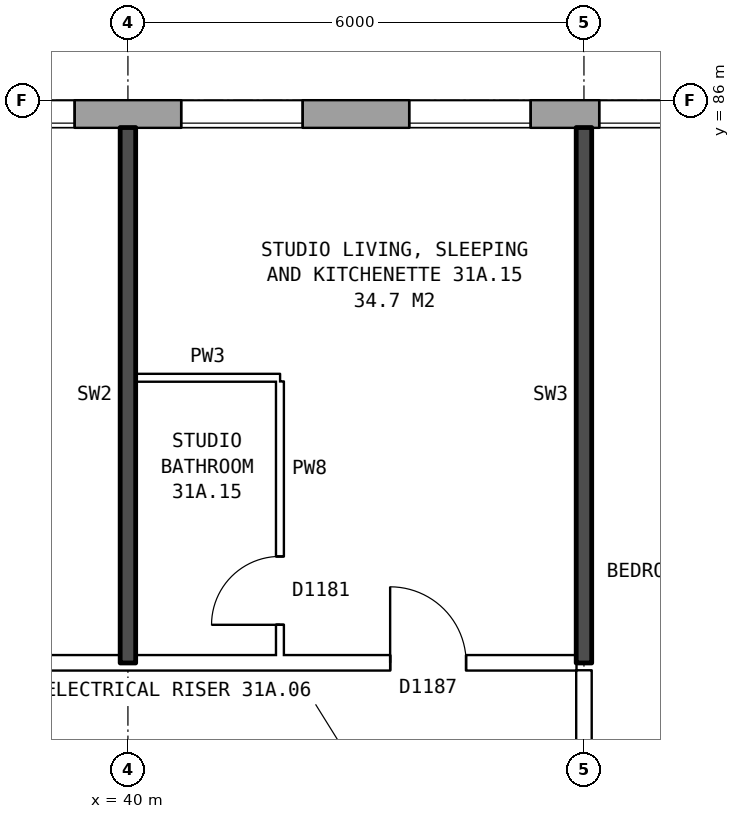
"""IFC4 building model, lengths in metres.
Left out: names, types, materials, properties, quantities, classifications, styles, units other than length and angle.
Written with IfcOpenShell. Run it as: python <this file> out.ifc"""

import sys

from ifc_helpers import new_model, si_unit, direction, frame, frame_2d, origin, place, context, subcontext, project, spatial, rectangle, extrude, element, fill, save


model = new_model("IFC4")
c1 = context("Model", 3, precision=1e-05, world=origin(), true_north=direction((0.0, 1.0)))
c2 = subcontext(c1, "Body", "Model", "MODEL_VIEW")
j1 = project(units=[si_unit("LENGTHUNIT", "METRE"), si_unit("PLANEANGLEUNIT", "RADIAN")], contexts=[c1])
p1 = place(None, origin())
s1 = spatial("IfcSite", under=j1, at=p1, CompositionType="ELEMENT")
p2 = place(p1, origin())
s2 = spatial("IfcBuilding", under=s1, at=p2, CompositionType="ELEMENT")
p3 = place(p2, frame((0.0, 0.0, 111.9)))
s3 = spatial("IfcBuildingStorey", under=s2, at=p3, CompositionType="ELEMENT", Elevation=111.9)
p4 = place(p3, frame((72.925, 85.82, 0.0), z_axis=(0.0, 0.0, 1.0), x_axis=(-1.0, 0.0, 0.0)))
e1 = element("IfcWall", 1, at=p4, inside=s3, PredefinedType="STANDARD", context=c2, shape_type="SweptSolid", body=[
    extrude(rectangle(XDim=44.851, YDim=0.36, at=frame_2d((22.425, 0.0))), origin(), (0.0, 0.0, 1.0), 2.85),
])
p5 = place(p4, frame((0.625, 0.0, 0.8)))
e2 = element("IfcOpeningElement", 2, at=p5, cuts=e1, PredefinedType="OPENING", context=c2, shape_type="SweptSolid", body=[
    extrude(rectangle(XDim=1.6, YDim=1.8, at=frame_2d((0.8, 0.9))), frame((0.0, 0.19, 0.0), z_axis=(0.0, -1.0, 0.0), x_axis=(1.0, 0.0, 0.0)), (0.0, 0.0, 1.0), 0.38),
])
p6 = place(p4, frame((3.625, 0.0, 0.8)))
e3 = element("IfcOpeningElement", 3, at=p6, cuts=e1, PredefinedType="OPENING", context=c2, shape_type="SweptSolid", body=[
    extrude(rectangle(XDim=1.6, YDim=1.8, at=frame_2d((0.8, 0.9))), frame((0.0, 0.19, 0.0), z_axis=(0.0, -1.0, 0.0), x_axis=(1.0, 0.0, 0.0)), (0.0, 0.0, 1.0), 0.38),
])
p7 = place(p4, frame((6.625, 0.0, 0.8)))
e4 = element("IfcOpeningElement", 4, at=p7, cuts=e1, PredefinedType="OPENING", context=c2, shape_type="SweptSolid", body=[
    extrude(rectangle(XDim=1.6, YDim=1.8, at=frame_2d((0.8, 0.9))), frame((0.0, 0.19, 0.0), z_axis=(0.0, -1.0, 0.0), x_axis=(1.0, 0.0, 0.0)), (0.0, 0.0, 1.0), 0.38),
])
p8 = place(p4, frame((9.625, 0.0, 0.8)))
e5 = element("IfcOpeningElement", 5, at=p8, cuts=e1, PredefinedType="OPENING", context=c2, shape_type="SweptSolid", body=[
    extrude(rectangle(XDim=1.6, YDim=1.8, at=frame_2d((0.8, 0.9))), frame((0.0, 0.19, 0.0), z_axis=(0.0, -1.0, 0.0), x_axis=(1.0, 0.0, 0.0)), (0.0, 0.0, 1.0), 0.38),
])
p9 = place(p4, frame((12.625, 0.0, 0.8)))
e6 = element("IfcOpeningElement", 6, at=p9, cuts=e1, PredefinedType="OPENING", context=c2, shape_type="SweptSolid", body=[
    extrude(rectangle(XDim=1.6, YDim=1.8, at=frame_2d((0.8, 0.9))), frame((0.0, 0.19, 0.0), z_axis=(0.0, -1.0, 0.0), x_axis=(1.0, 0.0, 0.0)), (0.0, 0.0, 1.0), 0.38),
])
p10 = place(p4, frame((15.625, 0.0, 0.8)))
e7 = element("IfcOpeningElement", 7, at=p10, cuts=e1, PredefinedType="OPENING", context=c2, shape_type="SweptSolid", body=[
    extrude(rectangle(XDim=1.6, YDim=1.8, at=frame_2d((0.8, 0.9))), frame((0.0, 0.19, 0.0), z_axis=(0.0, -1.0, 0.0), x_axis=(1.0, 0.0, 0.0)), (0.0, 0.0, 1.0), 0.38),
])
p11 = place(p4, frame((18.125, 0.0, 0.8)))
e8 = element("IfcOpeningElement", 8, at=p11, cuts=e1, PredefinedType="OPENING", context=c2, shape_type="SweptSolid", body=[
    extrude(rectangle(XDim=1.0, YDim=1.8, at=frame_2d((0.5, 0.9))), frame((0.0, 0.19, 0.0), z_axis=(0.0, -1.0, 0.0), x_axis=(1.0, 0.0, 0.0)), (0.0, 0.0, 1.0), 0.38),
])
p12 = place(p4, frame((21.725, 0.0, 0.55)))
e9 = element("IfcOpeningElement", 9, at=p12, cuts=e1, PredefinedType="OPENING", context=c2, shape_type="SweptSolid", body=[
    extrude(rectangle(XDim=1.4, YDim=1.2, at=frame_2d((0.7, 0.6))), frame((0.0, 0.19, 0.0), z_axis=(0.0, -1.0, 0.0), x_axis=(1.0, 0.0, 0.0)), (0.0, 0.0, 1.0), 0.38),
])
p13 = place(p4, frame((24.425, 0.0, 1.7)))
e10 = element("IfcOpeningElement", 10, at=p13, cuts=e1, PredefinedType="OPENING", context=c2, shape_type="SweptSolid", body=[
    extrude(rectangle(XDim=1.0, YDim=0.9, at=frame_2d((0.5, 0.45))), frame((0.0, 0.19, 0.0), z_axis=(0.0, -1.0, 0.0), x_axis=(1.0, 0.0, 0.0)), (0.0, 0.0, 1.0), 0.38),
])
p14 = place(p4, frame((27.625, 0.0, 0.8)))
e11 = element("IfcOpeningElement", 11, at=p14, cuts=e1, PredefinedType="OPENING", context=c2, shape_type="SweptSolid", body=[
    extrude(rectangle(XDim=1.6, YDim=1.8, at=frame_2d((0.8, 0.9))), frame((0.0, 0.19, 0.0), z_axis=(0.0, -1.0, 0.0), x_axis=(1.0, 0.0, 0.0)), (0.0, 0.0, 1.0), 0.38),
])
p15 = place(p4, frame((30.625, 0.0, 0.8)))
e12 = element("IfcOpeningElement", 12, at=p15, cuts=e1, PredefinedType="OPENING", context=c2, shape_type="SweptSolid", body=[
    extrude(rectangle(XDim=1.6, YDim=1.8, at=frame_2d((0.8, 0.9))), frame((0.0, 0.19, 0.0), z_axis=(0.0, -1.0, 0.0), x_axis=(1.0, 0.0, 0.0)), (0.0, 0.0, 1.0), 0.38),
])
p16 = place(p4, frame((33.625, 0.0, 0.8)))
e13 = element("IfcOpeningElement", 13, at=p16, cuts=e1, PredefinedType="OPENING", context=c2, shape_type="SweptSolid", body=[
    extrude(rectangle(XDim=1.6, YDim=1.8, at=frame_2d((0.8, 0.9))), frame((0.0, 0.19, 0.0), z_axis=(0.0, -1.0, 0.0), x_axis=(1.0, 0.0, 0.0)), (0.0, 0.0, 1.0), 0.38),
])
p17 = place(p4, frame((36.625, 0.0, 0.8)))
e14 = element("IfcOpeningElement", 14, at=p17, cuts=e1, PredefinedType="OPENING", context=c2, shape_type="SweptSolid", body=[
    extrude(rectangle(XDim=1.6, YDim=1.8, at=frame_2d((0.8, 0.9))), frame((0.0, 0.19, 0.0), z_axis=(0.0, -1.0, 0.0), x_axis=(1.0, 0.0, 0.0)), (0.0, 0.0, 1.0), 0.38),
])
p18 = place(p4, frame((39.625, 0.0, 0.8)))
e15 = element("IfcOpeningElement", 15, at=p18, cuts=e1, PredefinedType="OPENING", context=c2, shape_type="SweptSolid", body=[
    extrude(rectangle(XDim=1.6, YDim=1.8, at=frame_2d((0.8, 0.9))), frame((0.0, 0.19, 0.0), z_axis=(0.0, -1.0, 0.0), x_axis=(1.0, 0.0, 0.0)), (0.0, 0.0, 1.0), 0.38),
])
p19 = place(p4, frame((42.625, 0.0, 0.8)))
e16 = element("IfcOpeningElement", 16, at=p19, cuts=e1, PredefinedType="OPENING", context=c2, shape_type="SweptSolid", body=[
    extrude(rectangle(XDim=1.6, YDim=1.8, at=frame_2d((0.8, 0.9))), frame((0.0, 0.19, 0.0), z_axis=(0.0, -1.0, 0.0), x_axis=(1.0, 0.0, 0.0)), (0.0, 0.0, 1.0), 0.38),
])
p20 = place(p4, frame((19.425, 0.0, 1.7)))
e17 = element("IfcOpeningElement", 17, at=p20, cuts=e1, PredefinedType="OPENING", context=c2, shape_type="SweptSolid", body=[
    extrude(rectangle(XDim=1.0, YDim=0.9, at=frame_2d((0.5, 0.45))), frame((0.0, 0.19, 0.0), z_axis=(0.0, -1.0, 0.0), x_axis=(1.0, 0.0, 0.0)), (0.0, 0.0, 1.0), 0.38),
])
p21 = place(p4, frame((25.725, 0.0, 0.8)))
e18 = element("IfcOpeningElement", 18, at=p21, cuts=e1, PredefinedType="OPENING", context=c2, shape_type="SweptSolid", body=[
    extrude(rectangle(XDim=1.0, YDim=1.8, at=frame_2d((0.5, 0.9))), frame((0.0, 0.19, 0.0), z_axis=(0.0, -1.0, 0.0), x_axis=(1.0, 0.0, 0.0)), (0.0, 0.0, 1.0), 0.38),
])
p22 = place(p3, frame((25.36, 78.6, 0.0), z_axis=(0.0, 0.0, 1.0), x_axis=(1.0, 0.0, 0.0)))
e19 = element("IfcWall", 19, at=p22, inside=s3, PredefinedType="PARTITIONING", context=c2, shape_type="SweptSolid", body=[
    extrude(rectangle(XDim=20.54, YDim=0.2, at=frame_2d((10.27, 0.0))), origin(), (0.0, 0.0, 1.0), 2.85),
])
p23 = place(p22, frame((18.09, 0.0, 0.0)))
e20 = element("IfcOpeningElement", 20, at=p23, cuts=e19, PredefinedType="OPENING", context=c2, shape_type="SweptSolid", body=[
    extrude(rectangle(XDim=1.0, YDim=2.1, at=frame_2d((0.5, 1.05))), frame((0.0, 0.11, 0.0), z_axis=(0.0, -1.0, 0.0), x_axis=(1.0, 0.0, 0.0)), (0.0, 0.0, 1.0), 0.22),
])
p24 = place(p22, frame((12.14, 0.0, 0.0)))
e21 = element("IfcOpeningElement", 21, at=p24, cuts=e19, PredefinedType="OPENING", context=c2, shape_type="SweptSolid", body=[
    extrude(rectangle(XDim=1.0, YDim=2.1, at=frame_2d((0.5, 1.05))), frame((0.0, 0.11, 0.0), z_axis=(0.0, -1.0, 0.0), x_axis=(1.0, 0.0, 0.0)), (0.0, 0.0, 1.0), 0.22),
])
p25 = place(p22, frame((6.34, 0.0, 0.0)))
e22 = element("IfcOpeningElement", 22, at=p25, cuts=e19, PredefinedType="OPENING", context=c2, shape_type="SweptSolid", body=[
    extrude(rectangle(XDim=1.0, YDim=2.1, at=frame_2d((0.5, 1.05))), frame((0.0, 0.11, 0.0), z_axis=(0.0, -1.0, 0.0), x_axis=(1.0, 0.0, 0.0)), (0.0, 0.0, 1.0), 0.22),
])
p26 = place(p3, frame((40.1, 82.35, 0.0), z_axis=(0.0, 0.0, 1.0), x_axis=(1.0, 0.0, 0.0)))
e23 = element("IfcWall", 23, at=p26, inside=s3, PredefinedType="PARTITIONING", context=c2, shape_type="SweptSolid", body=[
    extrude(rectangle(XDim=1.9, YDim=0.1, at=frame_2d((0.95, 0.0))), origin(), (0.0, 0.0, 1.0), 2.85),
])
p27 = place(p3, frame((40.0, 78.6, 0.0), z_axis=(0.0, 0.0, 1.0), x_axis=(0.0, 1.0, 0.0)))
e24 = element("IfcWall", 24, at=p27, inside=s3, PredefinedType="SOLIDWALL", context=c2, shape_type="SweptSolid", body=[
    extrude(rectangle(XDim=7.04, YDim=0.2, at=frame_2d((3.52, 0.0))), origin(), (0.0, 0.0, 1.0), 2.85),
])
p28 = place(p3, frame((42.0, 78.7, 0.0), z_axis=(0.0, 0.0, 1.0), x_axis=(0.0, 1.0, 0.0)))
e25 = element("IfcWall", 25, at=p28, inside=s3, PredefinedType="PARTITIONING", context=c2, shape_type="SweptSolid", body=[
    extrude(rectangle(XDim=3.6, YDim=0.1, at=frame_2d((1.8, 0.0))), origin(), (0.0, 0.0, 1.0), 2.85),
])
p29 = place(p28, frame((0.4, 0.0, 0.0)))
e26 = element("IfcOpeningElement", 26, at=p29, cuts=e25, PredefinedType="OPENING", context=c2, shape_type="SweptSolid", body=[
    extrude(rectangle(XDim=0.9, YDim=2.1, at=frame_2d((0.45, 1.05))), frame((0.0, 0.06, 0.0), z_axis=(0.0, -1.0, 0.0), x_axis=(1.0, 0.0, 0.0)), (0.0, 0.0, 1.0), 0.12),
])
p30 = place(p3, frame((46.0, 76.3, 0.0), z_axis=(0.0, 0.0, 1.0), x_axis=(0.0, 1.0, 0.0)))
e27 = element("IfcWall", 27, at=p30, inside=s3, PredefinedType="PARTITIONING", context=c2, shape_type="SweptSolid", body=[
    extrude(rectangle(XDim=2.2, YDim=0.2, at=frame_2d((1.1, 0.0))), origin(), (0.0, 0.0, 1.0), 2.85),
])
p31 = place(p3, frame((46.0, 78.6, 0.0), z_axis=(0.0, 0.0, 1.0), x_axis=(0.0, 1.0, 0.0)))
e28 = element("IfcWall", 28, at=p31, inside=s3, PredefinedType="SOLIDWALL", context=c2, shape_type="SweptSolid", body=[
    extrude(rectangle(XDim=7.04, YDim=0.2, at=frame_2d((3.52, 0.0))), origin(), (0.0, 0.0, 1.0), 2.85),
])
p32 = place(p14, origin())
e29 = element("IfcWindow", 29, at=p32, inside=s3, PartitioningType="SINGLE_PANEL", PredefinedType="WINDOW", context=c2, shape_type="SweptSolid", body=[
    extrude(rectangle(XDim=1.6, YDim=1.8, at=frame_2d((0.8, 0.9))), frame((0.0, 0.15, 0.0), z_axis=(0.0, -1.0, 0.0), x_axis=(1.0, 0.0, 0.0)), (0.0, 0.0, 1.0), 0.06),
])
fill(e11, e29)
p33 = place(p15, origin())
e30 = element("IfcWindow", 30, at=p33, inside=s3, PartitioningType="SINGLE_PANEL", PredefinedType="WINDOW", context=c2, shape_type="SweptSolid", body=[
    extrude(rectangle(XDim=1.6, YDim=1.8, at=frame_2d((0.8, 0.9))), frame((0.0, 0.15, 0.0), z_axis=(0.0, -1.0, 0.0), x_axis=(1.0, 0.0, 0.0)), (0.0, 0.0, 1.0), 0.06),
])
fill(e12, e30)
p34 = place(p16, origin())
e31 = element("IfcWindow", 31, at=p34, inside=s3, PartitioningType="SINGLE_PANEL", PredefinedType="WINDOW", context=c2, shape_type="SweptSolid", body=[
    extrude(rectangle(XDim=1.6, YDim=1.8, at=frame_2d((0.8, 0.9))), frame((0.0, 0.15, 0.0), z_axis=(0.0, -1.0, 0.0), x_axis=(1.0, 0.0, 0.0)), (0.0, 0.0, 1.0), 0.06),
])
fill(e13, e31)
p35 = place(p23, origin())
e32 = element("IfcDoor", 32, at=p35, inside=s3, OperationType="SINGLE_SWING_LEFT", PredefinedType="DOOR", context=c2, shape_type="SweptSolid", body=[
    extrude(rectangle(XDim=1.0, YDim=2.1, at=frame_2d((0.5, 1.05))), frame((0.0, 0.025, 0.0), z_axis=(0.0, -1.0, 0.0), x_axis=(1.0, 0.0, 0.0)), (0.0, 0.0, 1.0), 0.05),
])
fill(e20, e32)
p36 = place(p29, origin())
e33 = element("IfcDoor", 33, at=p36, inside=s3, OperationType="SINGLE_SWING_LEFT", PredefinedType="DOOR", context=c2, shape_type="SweptSolid", body=[
    extrude(rectangle(XDim=0.9, YDim=2.1, at=frame_2d((0.45, 1.05))), frame((0.0, 0.025, 0.0), z_axis=(0.0, -1.0, 0.0), x_axis=(1.0, 0.0, 0.0)), (0.0, 0.0, 1.0), 0.05),
])
fill(e26, e33)
p37 = place(p21, origin())
e34 = element("IfcWindow", 34, at=p37, inside=s3, PartitioningType="SINGLE_PANEL", PredefinedType="WINDOW", context=c2, shape_type="SweptSolid", body=[
    extrude(rectangle(XDim=1.0, YDim=1.8, at=frame_2d((0.5, 0.9))), frame((0.0, 0.15, 0.0), z_axis=(0.0, -1.0, 0.0), x_axis=(1.0, 0.0, 0.0)), (0.0, 0.0, 1.0), 0.06),
])
fill(e18, e34)
save(model, sys.argv[1])
